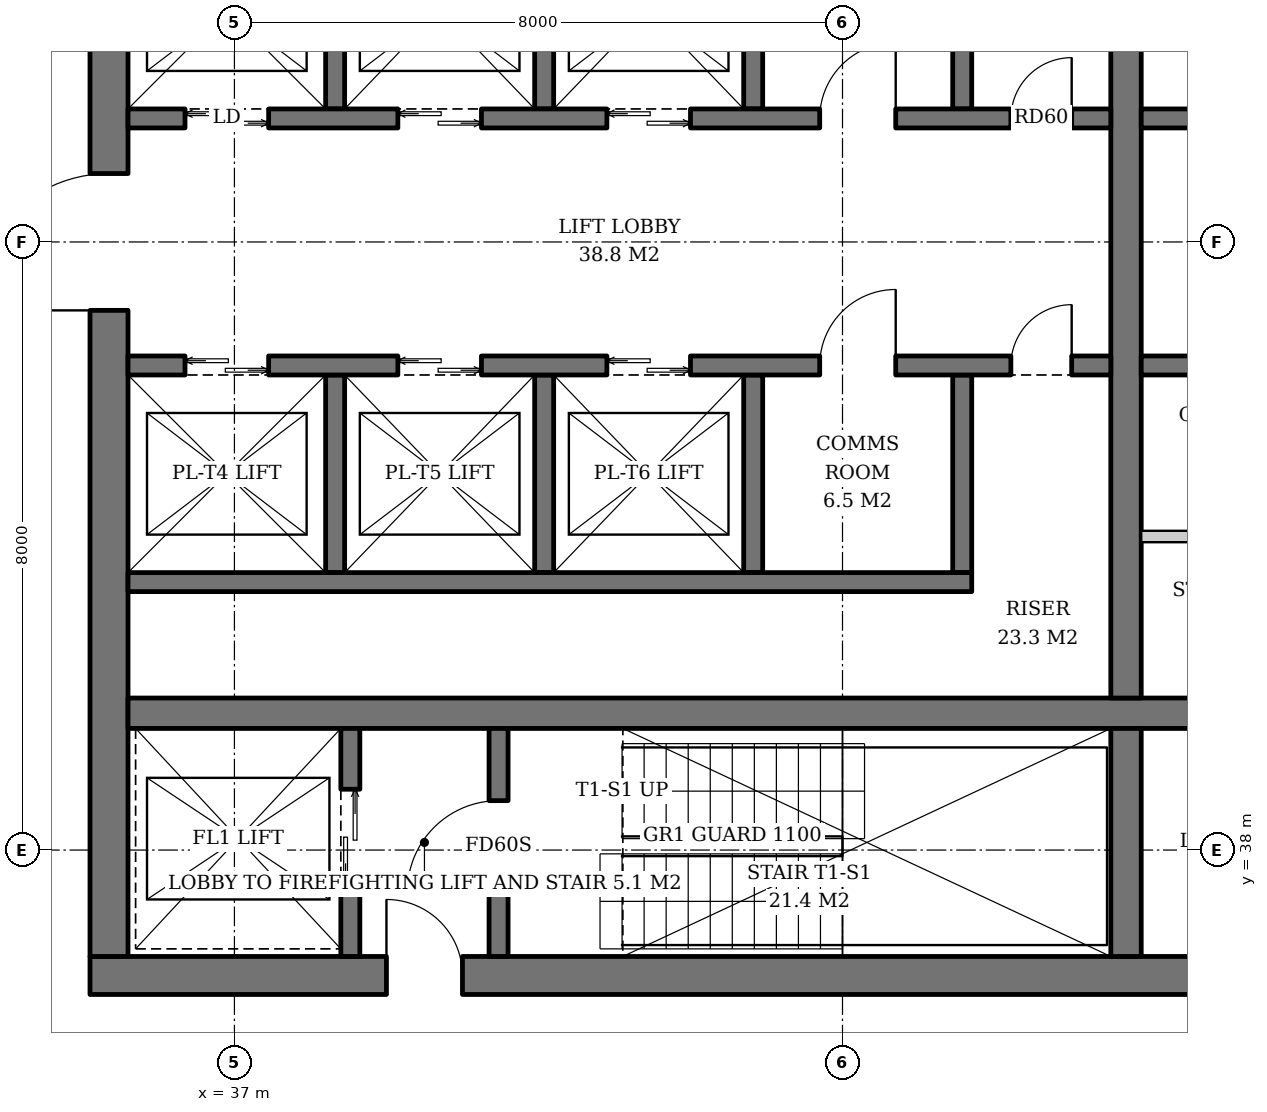
"""IFC4 building model, lengths in metres.
Left out: names, types, materials, properties, quantities, classifications, styles, units other than length and angle.
Written with IfcOpenShell. Run it as: python <this file> out.ifc"""

import sys

from ifc_helpers import new_model, si_unit, direction, frame, frame_2d, origin, place, context, subcontext, project, spatial, rectangle, extrude, element, fill, save


model = new_model("IFC4")
c1 = context("Model", 3, precision=1e-05, world=origin(), true_north=direction((0.0, 1.0)))
c2 = subcontext(c1, "Body", "Model", "MODEL_VIEW")
j1 = project(units=[si_unit("LENGTHUNIT", "METRE"), si_unit("PLANEANGLEUNIT", "RADIAN")], contexts=[c1])
p1 = place(None, origin())
s1 = spatial("IfcSite", under=j1, at=p1, CompositionType="ELEMENT")
p2 = place(p1, origin())
s2 = spatial("IfcBuilding", under=s1, at=p2, CompositionType="ELEMENT")
p3 = place(p2, frame((0.0, 0.0, 264.2)))
s3 = spatial("IfcBuildingStorey", under=s2, at=p3, CompositionType="ELEMENT", Elevation=264.2)
p4 = place(p3, frame((35.1, 36.35, 0.0), z_axis=(0.0, 0.0, 1.0), x_axis=(1.0, 0.0, 0.0)))
e1 = element("IfcWall", 1, at=p4, inside=s3, PredefinedType="SHEAR", context=c2, shape_type="SweptSolid", body=[
    extrude(rectangle(XDim=19.8, YDim=0.5, at=frame_2d((9.9, 0.0))), origin(), (0.0, 0.0, 1.0), 3.8),
])
p5 = place(p4, frame((3.9, 0.0, 0.0)))
e2 = element("IfcOpeningElement", 2, at=p5, cuts=e1, PredefinedType="OPENING", context=c2, shape_type="SweptSolid", body=[
    extrude(rectangle(XDim=1.0, YDim=2.1, at=frame_2d((0.5, 1.05))), frame((0.0, 0.26, 0.0), z_axis=(0.0, -1.0, 0.0), x_axis=(1.0, 0.0, 0.0)), (0.0, 0.0, 1.0), 0.52),
])
p6 = place(p4, frame((15.35, 0.0, 0.0)))
e3 = element("IfcOpeningElement", 3, at=p6, cuts=e1, PredefinedType="OPENING", context=c2, shape_type="SweptSolid", body=[
    extrude(rectangle(XDim=1.0, YDim=2.1, at=frame_2d((0.5, 1.05))), frame((0.0, 0.26, 0.0), z_axis=(0.0, -1.0, 0.0), x_axis=(1.0, 0.0, 0.0)), (0.0, 0.0, 1.0), 0.52),
])
p7 = place(p3, frame((35.35, 36.6, 0.0), z_axis=(0.0, 0.0, 1.0), x_axis=(0.0, 1.0, 0.0)))
e4 = element("IfcWall", 4, at=p7, inside=s3, PredefinedType="SHEAR", context=c2, shape_type="SweptSolid", body=[
    extrude(rectangle(XDim=18.8, YDim=0.5, at=frame_2d((9.4, 0.0))), origin(), (0.0, 0.0, 1.0), 3.8),
])
p8 = place(p7, frame((8.5, 0.0, 0.0)))
e5 = element("IfcOpeningElement", 5, at=p8, cuts=e4, PredefinedType="OPENING", context=c2, shape_type="SweptSolid", body=[
    extrude(rectangle(XDim=1.8, YDim=2.4, at=frame_2d((0.9, 1.2))), frame((0.0, 0.26, 0.0), z_axis=(0.0, -1.0, 0.0), x_axis=(1.0, 0.0, 0.0)), (0.0, 0.0, 1.0), 0.52),
])
p9 = place(p3, frame((35.6, 39.8, 0.0), z_axis=(0.0, 0.0, 1.0), x_axis=(1.0, 0.0, 0.0)))
e6 = element("IfcWall", 6, at=p9, inside=s3, PredefinedType="SHEAR", context=c2, shape_type="SweptSolid", body=[
    extrude(rectangle(XDim=18.8, YDim=0.4, at=frame_2d((9.4, 0.0))), origin(), (0.0, 0.0, 1.0), 3.8),
])
p10 = place(p3, frame((48.73, 36.6, 0.0), z_axis=(0.0, 0.0, 1.0), x_axis=(0.0, 1.0, 0.0)))
e7 = element("IfcWall", 7, at=p10, inside=s3, PredefinedType="SHEAR", context=c2, shape_type="SweptSolid", body=[
    extrude(rectangle(XDim=3.0, YDim=0.4, at=frame_2d((1.5, 0.0))), origin(), (0.0, 0.0, 1.0), 3.8),
])
p11 = place(p3, frame((48.73, 40.0, 0.0), z_axis=(0.0, 0.0, 1.0), x_axis=(0.0, 1.0, 0.0)))
e8 = element("IfcWall", 8, at=p11, inside=s3, PredefinedType="SHEAR", context=c2, shape_type="SweptSolid", body=[
    extrude(rectangle(XDim=12.0, YDim=0.4, at=frame_2d((6.0, 0.0))), origin(), (0.0, 0.0, 1.0), 3.8),
])
p12 = place(p3, frame((38.525, 36.6, 0.0), z_axis=(0.0, 0.0, 1.0), x_axis=(0.0, 1.0, 0.0)))
e9 = element("IfcWall", 9, at=p12, inside=s3, PredefinedType="SHEAR", context=c2, shape_type="SweptSolid", body=[
    extrude(rectangle(XDim=3.0, YDim=0.25, at=frame_2d((1.5, 0.0))), origin(), (0.0, 0.0, 1.0), 3.8),
])
p13 = place(p12, frame((0.9, 0.0, 0.0)))
e10 = element("IfcOpeningElement", 10, at=p13, cuts=e9, PredefinedType="OPENING", context=c2, shape_type="SweptSolid", body=[
    extrude(rectangle(XDim=1.3, YDim=2.2, at=frame_2d((0.65, 1.1))), frame((0.0, 0.135, 0.0), z_axis=(0.0, -1.0, 0.0), x_axis=(1.0, 0.0, 0.0)), (0.0, 0.0, 1.0), 0.27),
])
p14 = place(p3, frame((40.475, 36.6, 0.0), z_axis=(0.0, 0.0, 1.0), x_axis=(0.0, 1.0, 0.0)))
e11 = element("IfcWall", 11, at=p14, inside=s3, PredefinedType="SHEAR", context=c2, shape_type="SweptSolid", body=[
    extrude(rectangle(XDim=3.0, YDim=0.25, at=frame_2d((1.5, 0.0))), origin(), (0.0, 0.0, 1.0), 3.8),
])
p15 = place(p14, frame((0.85, 0.0, 0.0)))
e12 = element("IfcOpeningElement", 12, at=p15, cuts=e11, PredefinedType="OPENING", context=c2, shape_type="SweptSolid", body=[
    extrude(rectangle(XDim=1.2, YDim=2.1, at=frame_2d((0.6, 1.05))), frame((0.0, 0.135, 0.0), z_axis=(0.0, -1.0, 0.0), x_axis=(1.0, 0.0, 0.0)), (0.0, 0.0, 1.0), 0.27),
])
for number, where, z_axis, x_axis in (
    (13, (38.325, 47.75, 0.0), (0.0, 0.0, 1.0), (0.0, 1.0, 0.0)),
    (14, (41.075, 47.75, 0.0), (0.0, 0.0, 1.0), (0.0, 1.0, 0.0)),
    (15, (43.825, 47.75, 0.0), (0.0, 0.0, 1.0), (0.0, 1.0, 0.0)),
    (16, (46.575, 47.75, 0.0), (0.0, 0.0, 1.0), (0.0, 1.0, 0.0)),
):
    element("IfcWall", number, at=place(p3, frame(where, z_axis=z_axis, x_axis=x_axis)), inside=s3, PredefinedType="SHEAR", context=c2, shape_type="SweptSolid", body=[
        extrude(rectangle(XDim=2.6, YDim=0.25, at=frame_2d((1.3, 0.0))), origin(), (0.0, 0.0, 1.0), 3.8),
    ])
p16 = place(p3, frame((35.6, 47.625, 0.0), z_axis=(0.0, 0.0, 1.0), x_axis=(1.0, 0.0, 0.0)))
e17 = element("IfcWall", 17, at=p16, inside=s3, PredefinedType="SHEAR", context=c2, shape_type="SweptSolid", body=[
    extrude(rectangle(XDim=12.93, YDim=0.25, at=frame_2d((6.465, 0.0))), origin(), (0.0, 0.0, 1.0), 3.8),
])
p17 = place(p16, frame((0.75, 0.0, 0.0)))
e18 = element("IfcOpeningElement", 18, at=p17, cuts=e17, PredefinedType="OPENING", context=c2, shape_type="SweptSolid", body=[
    extrude(rectangle(XDim=1.1, YDim=2.2, at=frame_2d((0.55, 1.1))), frame((0.0, 0.135, 0.0), z_axis=(0.0, -1.0, 0.0), x_axis=(1.0, 0.0, 0.0)), (0.0, 0.0, 1.0), 0.27),
])
p18 = place(p16, frame((3.55, 0.0, 0.0)))
e19 = element("IfcOpeningElement", 19, at=p18, cuts=e17, PredefinedType="OPENING", context=c2, shape_type="SweptSolid", body=[
    extrude(rectangle(XDim=1.1, YDim=2.2, at=frame_2d((0.55, 1.1))), frame((0.0, 0.135, 0.0), z_axis=(0.0, -1.0, 0.0), x_axis=(1.0, 0.0, 0.0)), (0.0, 0.0, 1.0), 0.27),
])
p19 = place(p16, frame((6.3, 0.0, 0.0)))
e20 = element("IfcOpeningElement", 20, at=p19, cuts=e17, PredefinedType="OPENING", context=c2, shape_type="SweptSolid", body=[
    extrude(rectangle(XDim=1.1, YDim=2.2, at=frame_2d((0.55, 1.1))), frame((0.0, 0.135, 0.0), z_axis=(0.0, -1.0, 0.0), x_axis=(1.0, 0.0, 0.0)), (0.0, 0.0, 1.0), 0.27),
])
p20 = place(p16, frame((9.1, 0.0, 0.0)))
e21 = element("IfcOpeningElement", 21, at=p20, cuts=e17, PredefinedType="OPENING", context=c2, shape_type="SweptSolid", body=[
    extrude(rectangle(XDim=1.0, YDim=2.1, at=frame_2d((0.5, 1.05))), frame((0.0, 0.135, 0.0), z_axis=(0.0, -1.0, 0.0), x_axis=(1.0, 0.0, 0.0)), (0.0, 0.0, 1.0), 0.27),
])
p21 = place(p16, frame((11.615, 0.0, 0.0)))
e22 = element("IfcOpeningElement", 22, at=p21, cuts=e17, PredefinedType="OPENING", context=c2, shape_type="SweptSolid", body=[
    extrude(rectangle(XDim=0.8, YDim=2.0, at=frame_2d((0.4, 1.0))), frame((0.0, 0.135, 0.0), z_axis=(0.0, -1.0, 0.0), x_axis=(1.0, 0.0, 0.0)), (0.0, 0.0, 1.0), 0.27),
])
for number, where, z_axis, x_axis in (
    (23, (38.325, 44.25, 0.0), (0.0, 0.0, 1.0), (0.0, -1.0, 0.0)),
    (24, (41.075, 44.25, 0.0), (0.0, 0.0, 1.0), (0.0, -1.0, 0.0)),
    (25, (43.825, 44.25, 0.0), (0.0, 0.0, 1.0), (0.0, -1.0, 0.0)),
    (26, (46.575, 44.25, 0.0), (0.0, 0.0, 1.0), (0.0, -1.0, 0.0)),
):
    element("IfcWall", number, at=place(p3, frame(where, z_axis=z_axis, x_axis=x_axis)), inside=s3, PredefinedType="SHEAR", context=c2, shape_type="SweptSolid", body=[
        extrude(rectangle(XDim=2.6, YDim=0.25, at=frame_2d((1.3, 0.0))), origin(), (0.0, 0.0, 1.0), 3.8),
    ])
p22 = place(p3, frame((35.6, 41.525, 0.0), z_axis=(0.0, 0.0, 1.0), x_axis=(1.0, 0.0, 0.0)))
e27 = element("IfcWall", 27, at=p22, inside=s3, PredefinedType="SHEAR", context=c2, shape_type="SweptSolid", body=[
    extrude(rectangle(XDim=11.1, YDim=0.25, at=frame_2d((5.55, 0.0))), origin(), (0.0, 0.0, 1.0), 3.8),
])
p23 = place(p3, frame((35.6, 44.375, 0.0), z_axis=(0.0, 0.0, 1.0), x_axis=(1.0, 0.0, 0.0)))
e28 = element("IfcWall", 28, at=p23, inside=s3, PredefinedType="SHEAR", context=c2, shape_type="SweptSolid", body=[
    extrude(rectangle(XDim=12.93, YDim=0.25, at=frame_2d((6.465, 0.0))), origin(), (0.0, 0.0, 1.0), 3.8),
])
p24 = place(p23, frame((0.75, 0.0, 0.0)))
e29 = element("IfcOpeningElement", 29, at=p24, cuts=e28, PredefinedType="OPENING", context=c2, shape_type="SweptSolid", body=[
    extrude(rectangle(XDim=1.1, YDim=2.2, at=frame_2d((0.55, 1.1))), frame((0.0, 0.135, 0.0), z_axis=(0.0, -1.0, 0.0), x_axis=(1.0, 0.0, 0.0)), (0.0, 0.0, 1.0), 0.27),
])
p25 = place(p23, frame((3.55, 0.0, 0.0)))
e30 = element("IfcOpeningElement", 30, at=p25, cuts=e28, PredefinedType="OPENING", context=c2, shape_type="SweptSolid", body=[
    extrude(rectangle(XDim=1.1, YDim=2.2, at=frame_2d((0.55, 1.1))), frame((0.0, 0.135, 0.0), z_axis=(0.0, -1.0, 0.0), x_axis=(1.0, 0.0, 0.0)), (0.0, 0.0, 1.0), 0.27),
])
p26 = place(p23, frame((6.3, 0.0, 0.0)))
e31 = element("IfcOpeningElement", 31, at=p26, cuts=e28, PredefinedType="OPENING", context=c2, shape_type="SweptSolid", body=[
    extrude(rectangle(XDim=1.1, YDim=2.2, at=frame_2d((0.55, 1.1))), frame((0.0, 0.135, 0.0), z_axis=(0.0, -1.0, 0.0), x_axis=(1.0, 0.0, 0.0)), (0.0, 0.0, 1.0), 0.27),
])
p27 = place(p23, frame((9.1, 0.0, 0.0)))
e32 = element("IfcOpeningElement", 32, at=p27, cuts=e28, PredefinedType="OPENING", context=c2, shape_type="SweptSolid", body=[
    extrude(rectangle(XDim=1.0, YDim=2.1, at=frame_2d((0.5, 1.05))), frame((0.0, 0.135, 0.0), z_axis=(0.0, -1.0, 0.0), x_axis=(1.0, 0.0, 0.0)), (0.0, 0.0, 1.0), 0.27),
])
p28 = place(p23, frame((11.615, 0.0, 0.0)))
e33 = element("IfcOpeningElement", 33, at=p28, cuts=e28, PredefinedType="OPENING", context=c2, shape_type="SweptSolid", body=[
    extrude(rectangle(XDim=0.8, YDim=2.0, at=frame_2d((0.4, 1.0))), frame((0.0, 0.135, 0.0), z_axis=(0.0, -1.0, 0.0), x_axis=(1.0, 0.0, 0.0)), (0.0, 0.0, 1.0), 0.27),
])
p29 = place(p3, frame((48.93, 47.625, 0.0), z_axis=(0.0, 0.0, 1.0), x_axis=(1.0, 0.0, 0.0)))
e34 = element("IfcWall", 34, at=p29, inside=s3, PredefinedType="SHEAR", context=c2, shape_type="SweptSolid", body=[
    extrude(rectangle(XDim=5.47, YDim=0.25, at=frame_2d((2.735, 0.0))), origin(), (0.0, 0.0, 1.0), 3.8),
])
p30 = place(p29, frame((0.78, 0.0, 0.0)))
e35 = element("IfcOpeningElement", 35, at=p30, cuts=e34, PredefinedType="OPENING", context=c2, shape_type="SweptSolid", body=[
    extrude(rectangle(XDim=1.0, YDim=2.1, at=frame_2d((0.5, 1.05))), frame((0.0, 0.135, 0.0), z_axis=(0.0, -1.0, 0.0), x_axis=(1.0, 0.0, 0.0)), (0.0, 0.0, 1.0), 0.27),
])
p31 = place(p29, frame((3.64, 0.0, 0.0)))
e36 = element("IfcOpeningElement", 36, at=p31, cuts=e34, PredefinedType="OPENING", context=c2, shape_type="SweptSolid", body=[
    extrude(rectangle(XDim=1.0, YDim=2.1, at=frame_2d((0.5, 1.05))), frame((0.0, 0.135, 0.0), z_axis=(0.0, -1.0, 0.0), x_axis=(1.0, 0.0, 0.0)), (0.0, 0.0, 1.0), 0.27),
])
p32 = place(p3, frame((48.93, 44.375, 0.0), z_axis=(0.0, 0.0, 1.0), x_axis=(1.0, 0.0, 0.0)))
e37 = element("IfcWall", 37, at=p32, inside=s3, PredefinedType="SHEAR", context=c2, shape_type="SweptSolid", body=[
    extrude(rectangle(XDim=5.47, YDim=0.25, at=frame_2d((2.735, 0.0))), origin(), (0.0, 0.0, 1.0), 3.8),
])
p33 = place(p32, frame((0.78, 0.0, 0.0)))
e38 = element("IfcOpeningElement", 38, at=p33, cuts=e37, PredefinedType="OPENING", context=c2, shape_type="SweptSolid", body=[
    extrude(rectangle(XDim=1.0, YDim=2.1, at=frame_2d((0.5, 1.05))), frame((0.0, 0.135, 0.0), z_axis=(0.0, -1.0, 0.0), x_axis=(1.0, 0.0, 0.0)), (0.0, 0.0, 1.0), 0.27),
])
p34 = place(p32, frame((3.64, 0.0, 0.0)))
e39 = element("IfcOpeningElement", 39, at=p34, cuts=e37, PredefinedType="OPENING", context=c2, shape_type="SweptSolid", body=[
    extrude(rectangle(XDim=1.0, YDim=2.1, at=frame_2d((0.5, 1.05))), frame((0.0, 0.135, 0.0), z_axis=(0.0, -1.0, 0.0), x_axis=(1.0, 0.0, 0.0)), (0.0, 0.0, 1.0), 0.27),
])
p35 = place(p3, frame((48.93, 42.125, 0.0), z_axis=(0.0, 0.0, 1.0), x_axis=(1.0, 0.0, 0.0)))
e40 = element("IfcWall", 40, at=p35, inside=s3, PredefinedType="SOLIDWALL", context=c2, shape_type="SweptSolid", body=[
    extrude(rectangle(XDim=2.56, YDim=0.15, at=frame_2d((1.28, 0.0))), origin(), (0.0, 0.0, 1.0), 3.62),
])
p36 = place(p35, frame((0.78, 0.0, 0.0)))
e41 = element("IfcOpeningElement", 41, at=p36, cuts=e40, PredefinedType="OPENING", context=c2, shape_type="SweptSolid", body=[
    extrude(rectangle(XDim=1.0, YDim=2.1, at=frame_2d((0.5, 1.05))), frame((0.0, 0.085, 0.0), z_axis=(0.0, -1.0, 0.0), x_axis=(1.0, 0.0, 0.0)), (0.0, 0.0, 1.0), 0.17),
])
p37 = place(p13, origin())
e42 = element("IfcDoor", 42, at=p37, inside=s3, OperationType="DOUBLE_DOOR_SLIDING", PredefinedType="DOOR", context=c2, shape_type="SweptSolid", body=[
    extrude(rectangle(XDim=1.3, YDim=2.2, at=frame_2d((0.65, 1.1))), frame((0.0, 0.025, 0.0), z_axis=(0.0, -1.0, 0.0), x_axis=(1.0, 0.0, 0.0)), (0.0, 0.0, 1.0), 0.05),
])
fill(e10, e42)
p38 = place(p15, origin())
e43 = element("IfcDoor", 43, at=p38, inside=s3, OperationType="SINGLE_SWING_LEFT", PredefinedType="DOOR", context=c2, shape_type="SweptSolid", body=[
    extrude(rectangle(XDim=1.2, YDim=2.1, at=frame_2d((0.6, 1.05))), frame((0.0, 0.025, 0.0), z_axis=(0.0, -1.0, 0.0), x_axis=(1.0, 0.0, 0.0)), (0.0, 0.0, 1.0), 0.05),
])
fill(e12, e43)
p39 = place(p17, origin())
e44 = element("IfcDoor", 44, at=p39, inside=s3, OperationType="DOUBLE_DOOR_SLIDING", PredefinedType="DOOR", context=c2, shape_type="SweptSolid", body=[
    extrude(rectangle(XDim=1.1, YDim=2.2, at=frame_2d((0.55, 1.1))), frame((0.0, 0.025, 0.0), z_axis=(0.0, -1.0, 0.0), x_axis=(1.0, 0.0, 0.0)), (0.0, 0.0, 1.0), 0.05),
])
fill(e18, e44)
p40 = place(p18, origin())
e45 = element("IfcDoor", 45, at=p40, inside=s3, OperationType="DOUBLE_DOOR_SLIDING", PredefinedType="DOOR", context=c2, shape_type="SweptSolid", body=[
    extrude(rectangle(XDim=1.1, YDim=2.2, at=frame_2d((0.55, 1.1))), frame((0.0, 0.025, 0.0), z_axis=(0.0, -1.0, 0.0), x_axis=(1.0, 0.0, 0.0)), (0.0, 0.0, 1.0), 0.05),
])
fill(e19, e45)
p41 = place(p19, origin())
e46 = element("IfcDoor", 46, at=p41, inside=s3, OperationType="DOUBLE_DOOR_SLIDING", PredefinedType="DOOR", context=c2, shape_type="SweptSolid", body=[
    extrude(rectangle(XDim=1.1, YDim=2.2, at=frame_2d((0.55, 1.1))), frame((0.0, 0.025, 0.0), z_axis=(0.0, -1.0, 0.0), x_axis=(1.0, 0.0, 0.0)), (0.0, 0.0, 1.0), 0.05),
])
fill(e20, e46)
p42 = place(p20, origin())
e47 = element("IfcDoor", 47, at=p42, inside=s3, OperationType="SINGLE_SWING_RIGHT", PredefinedType="DOOR", context=c2, shape_type="SweptSolid", body=[
    extrude(rectangle(XDim=1.0, YDim=2.1, at=frame_2d((0.5, 1.05))), frame((0.0, 0.025, 0.0), z_axis=(0.0, -1.0, 0.0), x_axis=(1.0, 0.0, 0.0)), (0.0, 0.0, 1.0), 0.05),
])
fill(e21, e47)
p43 = place(p21, origin())
e48 = element("IfcDoor", 48, at=p43, inside=s3, OperationType="SINGLE_SWING_RIGHT", PredefinedType="DOOR", context=c2, shape_type="SweptSolid", body=[
    extrude(rectangle(XDim=0.8, YDim=2.0, at=frame_2d((0.4, 1.0))), frame((0.0, 0.025, 0.0), z_axis=(0.0, -1.0, 0.0), x_axis=(1.0, 0.0, 0.0)), (0.0, 0.0, 1.0), 0.05),
])
fill(e22, e48)
p44 = place(p24, origin())
e49 = element("IfcDoor", 49, at=p44, inside=s3, OperationType="DOUBLE_DOOR_SLIDING", PredefinedType="DOOR", context=c2, shape_type="SweptSolid", body=[
    extrude(rectangle(XDim=1.1, YDim=2.2, at=frame_2d((0.55, 1.1))), frame((0.0, 0.025, 0.0), z_axis=(0.0, -1.0, 0.0), x_axis=(1.0, 0.0, 0.0)), (0.0, 0.0, 1.0), 0.05),
])
fill(e29, e49)
p45 = place(p25, origin())
e50 = element("IfcDoor", 50, at=p45, inside=s3, OperationType="DOUBLE_DOOR_SLIDING", PredefinedType="DOOR", context=c2, shape_type="SweptSolid", body=[
    extrude(rectangle(XDim=1.1, YDim=2.2, at=frame_2d((0.55, 1.1))), frame((0.0, 0.025, 0.0), z_axis=(0.0, -1.0, 0.0), x_axis=(1.0, 0.0, 0.0)), (0.0, 0.0, 1.0), 0.05),
])
fill(e30, e50)
p46 = place(p26, origin())
e51 = element("IfcDoor", 51, at=p46, inside=s3, OperationType="DOUBLE_DOOR_SLIDING", PredefinedType="DOOR", context=c2, shape_type="SweptSolid", body=[
    extrude(rectangle(XDim=1.1, YDim=2.2, at=frame_2d((0.55, 1.1))), frame((0.0, 0.025, 0.0), z_axis=(0.0, -1.0, 0.0), x_axis=(1.0, 0.0, 0.0)), (0.0, 0.0, 1.0), 0.05),
])
fill(e31, e51)
p47 = place(p27, origin())
e52 = element("IfcDoor", 52, at=p47, inside=s3, OperationType="SINGLE_SWING_RIGHT", PredefinedType="DOOR", context=c2, shape_type="SweptSolid", body=[
    extrude(rectangle(XDim=1.0, YDim=2.1, at=frame_2d((0.5, 1.05))), frame((0.0, 0.025, 0.0), z_axis=(0.0, -1.0, 0.0), x_axis=(1.0, 0.0, 0.0)), (0.0, 0.0, 1.0), 0.05),
])
fill(e32, e52)
p48 = place(p28, origin())
e53 = element("IfcDoor", 53, at=p48, inside=s3, OperationType="SINGLE_SWING_RIGHT", PredefinedType="DOOR", context=c2, shape_type="SweptSolid", body=[
    extrude(rectangle(XDim=0.8, YDim=2.0, at=frame_2d((0.4, 1.0))), frame((0.0, 0.025, 0.0), z_axis=(0.0, -1.0, 0.0), x_axis=(1.0, 0.0, 0.0)), (0.0, 0.0, 1.0), 0.05),
])
fill(e33, e53)
p49 = place(p5, origin())
e54 = element("IfcDoor", 54, at=p49, inside=s3, OperationType="SINGLE_SWING_LEFT", PredefinedType="DOOR", context=c2, shape_type="SweptSolid", body=[
    extrude(rectangle(XDim=1.0, YDim=2.1, at=frame_2d((0.5, 1.05))), frame((0.0, 0.025, 0.0), z_axis=(0.0, -1.0, 0.0), x_axis=(1.0, 0.0, 0.0)), (0.0, 0.0, 1.0), 0.05),
])
fill(e2, e54)
p50 = place(p8, origin())
e55 = element("IfcDoor", 55, at=p50, inside=s3, OperationType="DOUBLE_DOOR_SINGLE_SWING", PredefinedType="DOOR", context=c2, shape_type="SweptSolid", body=[
    extrude(rectangle(XDim=1.8, YDim=2.4, at=frame_2d((0.9, 1.2))), frame((0.0, 0.025, 0.0), z_axis=(0.0, -1.0, 0.0), x_axis=(1.0, 0.0, 0.0)), (0.0, 0.0, 1.0), 0.05),
])
fill(e5, e55)
save(model, sys.argv[1])
